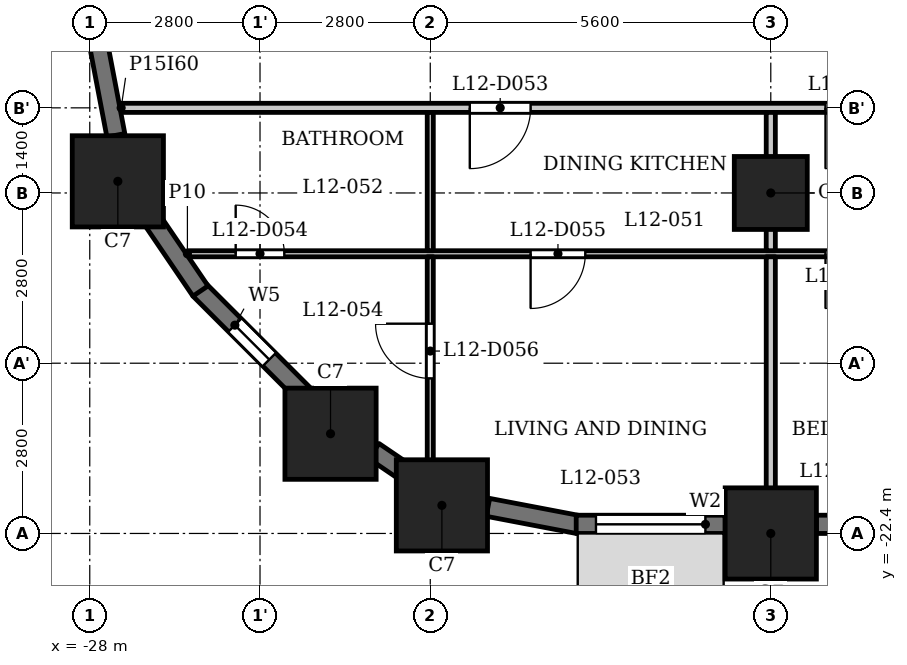
"""IFC4 building model, lengths in metres.
Left out: names, types, materials, properties, quantities, classifications, styles, units other than length and angle.
Written with IfcOpenShell. Run it as: python <this file> out.ifc"""

import sys

from ifc_helpers import new_model, si_unit, direction, frame, frame_2d, origin, origin_2d, place, context, subcontext, project, spatial, rectangle, extrude, element, fill, save


model = new_model("IFC4")
c1 = context("Model", 3, precision=1e-05, world=origin(), true_north=direction((0.0, 1.0)))
c2 = subcontext(c1, "Body", "Model", "MODEL_VIEW")
j1 = project(units=[si_unit("LENGTHUNIT", "METRE"), si_unit("PLANEANGLEUNIT", "RADIAN")], contexts=[c1])
p1 = place(None, origin())
s1 = spatial("IfcSite", under=j1, at=p1, CompositionType="ELEMENT")
p2 = place(p1, origin())
s2 = spatial("IfcBuilding", under=s1, at=p2, CompositionType="ELEMENT")
p3 = place(p2, frame((0.0, 0.0, 51.5)))
s3 = spatial("IfcBuildingStorey", under=s2, at=p3, CompositionType="ELEMENT", Elevation=51.5)
for number, where, z_axis, x_axis in (
    (1, (-22.209, -21.938, 0.0), (0.0, 0.0, 1.0), (1.0, 0.0, 0.0)),
    (2, (-16.8, -22.4, 0.0), (0.0, 0.0, 1.0), (1.0, 0.0, 0.0)),
    (3, (-27.538, -16.609, 0.0), (0.0, 0.0, 1.0), (1.0, 0.0, 0.0)),
    (4, (-24.04, -20.76, 0.0), (0.0, 0.0, 1.0), (1.0, 0.0, 0.0)),
):
    element("IfcColumn", number, at=place(p3, frame(where, z_axis=z_axis, x_axis=x_axis)), inside=s3, PredefinedType="COLUMN", context=c2, shape_type="SweptSolid", body=[
        extrude(rectangle(XDim=1.5, YDim=1.5, at=origin_2d()), origin(), (0.0, 0.0, 1.0), 3.5),
    ])
p4 = place(p3, frame((-16.8, -16.8, 0.0), z_axis=(0.0, 0.0, 1.0), x_axis=(1.0, 0.0, 0.0)))
e5 = element("IfcColumn", 5, at=p4, inside=s3, PredefinedType="COLUMN", context=c2, shape_type="SweptSolid", body=[
    extrude(rectangle(XDim=1.2, YDim=1.2, at=origin_2d()), origin(), (0.0, 0.0, 1.0), 3.5),
])
p5 = place(p3, frame((-26.197, -18.391, 0.0), z_axis=(0.0, 0.0, 1.0), x_axis=(0.707106781187, -0.707106781187, 0.0)))
e6 = element("IfcWall", 6, at=p5, inside=s3, PredefinedType="SOLIDWALL", context=c2, shape_type="SweptSolid", body=[
    extrude(rectangle(XDim=2.45, YDim=0.3, at=frame_2d((1.225, 0.0))), origin(), (0.0, 0.0, 1.0), 2.35),
])
p6 = place(p5, frame((0.825, 0.0, 0.6)))
e7 = element("IfcOpeningElement", 7, at=p6, cuts=e6, PredefinedType="OPENING", context=c2, shape_type="SweptSolid", body=[
    extrude(rectangle(XDim=0.8, YDim=1.55, at=frame_2d((0.4, 0.775))), frame((0.0, 0.16, 0.0), z_axis=(0.0, -1.0, 0.0), x_axis=(1.0, 0.0, 0.0)), (0.0, 0.0, 1.0), 0.32),
])
p7 = place(p3, frame((-23.327, -21.045, 0.0), z_axis=(0.0, 0.0, 1.0), x_axis=(0.827080706709, -0.562083182981, 0.0)))
e8 = element("IfcWall", 8, at=p7, inside=s3, PredefinedType="SOLIDWALL", context=c2, shape_type="SweptSolid", body=[
    extrude(rectangle(XDim=0.677, YDim=0.3, at=frame_2d((0.339, 0.0))), origin(), (0.0, 0.0, 1.0), 3.2),
])
p8 = place(p3, frame((-21.451, -21.97, 0.0), z_axis=(0.0, 0.0, 1.0), x_axis=(0.982287454367, -0.187380247071, 0.0)))
e9 = element("IfcWall", 9, at=p8, inside=s3, PredefinedType="SOLIDWALL", context=c2, shape_type="SweptSolid", body=[
    extrude(rectangle(XDim=1.506, YDim=0.3, at=frame_2d((0.753, 0.0))), origin(), (0.0, 0.0, 1.0), 2.35),
])
p9 = place(p3, frame((-20.0, -22.25, 0.0), z_axis=(0.0, 0.0, 1.0), x_axis=(1.0, 0.0, 0.0)))
e10 = element("IfcWall", 10, at=p9, inside=s3, PredefinedType="SOLIDWALL", context=c2, shape_type="SweptSolid", body=[
    extrude(rectangle(XDim=2.45, YDim=0.3, at=frame_2d((1.225, 0.0))), origin(), (0.0, 0.0, 1.0), 2.35),
])
p10 = place(p9, frame((0.325, 0.0, 0.9)))
e11 = element("IfcOpeningElement", 11, at=p10, cuts=e10, PredefinedType="OPENING", context=c2, shape_type="SweptSolid", body=[
    extrude(rectangle(XDim=1.8, YDim=1.25, at=frame_2d((0.9, 0.625))), frame((0.0, 0.16, 0.0), z_axis=(0.0, -1.0, 0.0), x_axis=(1.0, 0.0, 0.0)), (0.0, 0.0, 1.0), 0.32),
])
p11 = place(p3, frame((-16.05, -22.25, 0.0), z_axis=(0.0, 0.0, 1.0), x_axis=(1.0, 0.0, 0.0)))
e12 = element("IfcWall", 12, at=p11, inside=s3, PredefinedType="SOLIDWALL", context=c2, shape_type="SweptSolid", body=[
    extrude(rectangle(XDim=4.1, YDim=0.3, at=frame_2d((2.05, 0.0))), origin(), (0.0, 0.0, 1.0), 2.35),
])
p12 = place(p11, frame((0.387, 0.0, 0.6)))
e13 = element("IfcOpeningElement", 13, at=p12, cuts=e12, PredefinedType="OPENING", context=c2, shape_type="SweptSolid", body=[
    extrude(rectangle(XDim=1.2, YDim=1.55, at=frame_2d((0.6, 0.775))), frame((0.0, 0.16, 0.0), z_axis=(0.0, -1.0, 0.0), x_axis=(1.0, 0.0, 0.0)), (0.0, 0.0, 1.0), 0.32),
])
p13 = place(p11, frame((2.512, 0.0, 0.6)))
e14 = element("IfcOpeningElement", 14, at=p13, cuts=e12, PredefinedType="OPENING", context=c2, shape_type="SweptSolid", body=[
    extrude(rectangle(XDim=1.2, YDim=1.55, at=frame_2d((0.6, 0.775))), frame((0.0, 0.16, 0.0), z_axis=(0.0, -1.0, 0.0), x_axis=(1.0, 0.0, 0.0)), (0.0, 0.0, 1.0), 0.32),
])
for number, where, z_axis, x_axis in (
    (15, (-27.853, -14.372, 0.0), (0.0, 0.0, 1.0), (0.187, -0.982, 0.0)),
    (16, (-27.025, -17.167, 0.0), (0.0, 0.0, 1.0), (0.562, -0.827, 0.0)),
):
    element("IfcWall", number, at=place(p3, frame(where, z_axis=z_axis, x_axis=x_axis)), inside=s3, PredefinedType="SOLIDWALL", context=c2, shape_type="SweptSolid", body=[
        extrude(rectangle(XDim=1.506, YDim=0.3, at=frame_2d((0.753, 0.0))), origin(), (0.0, 0.0, 1.0), 2.35),
    ])
p14 = place(p3, frame((-26.394, -17.8, 0.0), z_axis=(0.0, 0.0, 1.0), x_axis=(1.0, 0.0, 0.0)))
e17 = element("IfcWall", 17, at=p14, inside=s3, PredefinedType="PARTITIONING", context=c2, shape_type="SweptSolid", body=[
    extrude(rectangle(XDim=53.126, YDim=0.1, at=frame_2d((26.563, 0.0))), origin(), (0.0, 0.0, 1.0), 3.2),
])
p15 = place(p14, frame((0.794, 0.0, 0.0)))
e18 = element("IfcOpeningElement", 18, at=p15, cuts=e17, PredefinedType="OPENING", context=c2, shape_type="SweptSolid", body=[
    extrude(rectangle(XDim=0.8, YDim=2.1, at=frame_2d((0.4, 1.05))), frame((0.0, 0.06, 0.0), z_axis=(0.0, -1.0, 0.0), x_axis=(1.0, 0.0, 0.0)), (0.0, 0.0, 1.0), 0.12),
])
p16 = place(p14, frame((5.644, 0.0, 0.0)))
e19 = element("IfcOpeningElement", 19, at=p16, cuts=e17, PredefinedType="OPENING", context=c2, shape_type="SweptSolid", body=[
    extrude(rectangle(XDim=0.9, YDim=2.1, at=frame_2d((0.45, 1.05))), frame((0.0, 0.06, 0.0), z_axis=(0.0, -1.0, 0.0), x_axis=(1.0, 0.0, 0.0)), (0.0, 0.0, 1.0), 0.12),
])
p17 = place(p14, frame((19.344, 0.0, 0.0)))
e20 = element("IfcOpeningElement", 20, at=p17, cuts=e17, PredefinedType="OPENING", context=c2, shape_type="SweptSolid", body=[
    extrude(rectangle(XDim=0.8, YDim=2.1, at=frame_2d((0.4, 1.05))), frame((0.0, 0.06, 0.0), z_axis=(0.0, -1.0, 0.0), x_axis=(1.0, 0.0, 0.0)), (0.0, 0.0, 1.0), 0.12),
])
p18 = place(p14, frame((17.094, 0.0, 0.0)))
e21 = element("IfcOpeningElement", 21, at=p18, cuts=e17, PredefinedType="OPENING", context=c2, shape_type="SweptSolid", body=[
    extrude(rectangle(XDim=0.9, YDim=2.1, at=frame_2d((0.45, 1.05))), frame((0.0, 0.06, 0.0), z_axis=(0.0, -1.0, 0.0), x_axis=(1.0, 0.0, 0.0)), (0.0, 0.0, 1.0), 0.12),
])
p19 = place(p14, frame((10.494, 0.0, 0.0)))
e22 = element("IfcOpeningElement", 22, at=p19, cuts=e17, PredefinedType="OPENING", context=c2, shape_type="SweptSolid", body=[
    extrude(rectangle(XDim=0.9, YDim=2.1, at=frame_2d((0.45, 1.05))), frame((0.0, 0.06, 0.0), z_axis=(0.0, -1.0, 0.0), x_axis=(1.0, 0.0, 0.0)), (0.0, 0.0, 1.0), 0.12),
])
p20 = place(p14, frame((13.294, 0.0, 0.0)))
e23 = element("IfcOpeningElement", 23, at=p20, cuts=e17, PredefinedType="OPENING", context=c2, shape_type="SweptSolid", body=[
    extrude(rectangle(XDim=0.9, YDim=2.1, at=frame_2d((0.45, 1.05))), frame((0.0, 0.06, 0.0), z_axis=(0.0, -1.0, 0.0), x_axis=(1.0, 0.0, 0.0)), (0.0, 0.0, 1.0), 0.12),
])
p21 = place(p14, frame((27.044, 0.0, 0.0)))
e24 = element("IfcOpeningElement", 24, at=p21, cuts=e17, PredefinedType="OPENING", context=c2, shape_type="SweptSolid", body=[
    extrude(rectangle(XDim=0.8, YDim=2.1, at=frame_2d((0.4, 1.05))), frame((0.0, 0.06, 0.0), z_axis=(0.0, -1.0, 0.0), x_axis=(1.0, 0.0, 0.0)), (0.0, 0.0, 1.0), 0.12),
])
p22 = place(p14, frame((22.444, 0.0, 0.0)))
e25 = element("IfcOpeningElement", 25, at=p22, cuts=e17, PredefinedType="OPENING", context=c2, shape_type="SweptSolid", body=[
    extrude(rectangle(XDim=0.9, YDim=2.1, at=frame_2d((0.45, 1.05))), frame((0.0, 0.06, 0.0), z_axis=(0.0, -1.0, 0.0), x_axis=(1.0, 0.0, 0.0)), (0.0, 0.0, 1.0), 0.12),
])
p23 = place(p14, frame((36.144, 0.0, 0.0)))
e26 = element("IfcOpeningElement", 26, at=p23, cuts=e17, PredefinedType="OPENING", context=c2, shape_type="SweptSolid", body=[
    extrude(rectangle(XDim=0.8, YDim=2.1, at=frame_2d((0.4, 1.05))), frame((0.0, 0.06, 0.0), z_axis=(0.0, -1.0, 0.0), x_axis=(1.0, 0.0, 0.0)), (0.0, 0.0, 1.0), 0.12),
])
p24 = place(p14, frame((33.644, 0.0, 0.0)))
e27 = element("IfcOpeningElement", 27, at=p24, cuts=e17, PredefinedType="OPENING", context=c2, shape_type="SweptSolid", body=[
    extrude(rectangle(XDim=0.9, YDim=2.1, at=frame_2d((0.45, 1.05))), frame((0.0, 0.06, 0.0), z_axis=(0.0, -1.0, 0.0), x_axis=(1.0, 0.0, 0.0)), (0.0, 0.0, 1.0), 0.12),
])
p25 = place(p14, frame((39.144, 0.0, 0.0)))
e28 = element("IfcOpeningElement", 28, at=p25, cuts=e17, PredefinedType="OPENING", context=c2, shape_type="SweptSolid", body=[
    extrude(rectangle(XDim=0.8, YDim=2.1, at=frame_2d((0.4, 1.05))), frame((0.0, 0.06, 0.0), z_axis=(0.0, -1.0, 0.0), x_axis=(1.0, 0.0, 0.0)), (0.0, 0.0, 1.0), 0.12),
])
p26 = place(p14, frame((41.494, 0.0, 0.0)))
e29 = element("IfcOpeningElement", 29, at=p26, cuts=e17, PredefinedType="OPENING", context=c2, shape_type="SweptSolid", body=[
    extrude(rectangle(XDim=0.9, YDim=2.1, at=frame_2d((0.45, 1.05))), frame((0.0, 0.06, 0.0), z_axis=(0.0, -1.0, 0.0), x_axis=(1.0, 0.0, 0.0)), (0.0, 0.0, 1.0), 0.12),
])
p27 = place(p14, frame((49.362, 0.0, 0.0)))
e30 = element("IfcOpeningElement", 30, at=p27, cuts=e17, PredefinedType="OPENING", context=c2, shape_type="SweptSolid", body=[
    extrude(rectangle(XDim=0.8, YDim=2.1, at=frame_2d((0.4, 1.05))), frame((0.0, 0.06, 0.0), z_axis=(0.0, -1.0, 0.0), x_axis=(1.0, 0.0, 0.0)), (0.0, 0.0, 1.0), 0.12),
])
p28 = place(p14, frame((45.094, 0.0, 0.0)))
e31 = element("IfcOpeningElement", 31, at=p28, cuts=e17, PredefinedType="OPENING", context=c2, shape_type="SweptSolid", body=[
    extrude(rectangle(XDim=0.9, YDim=2.1, at=frame_2d((0.45, 1.05))), frame((0.0, 0.06, 0.0), z_axis=(0.0, -1.0, 0.0), x_axis=(1.0, 0.0, 0.0)), (0.0, 0.0, 1.0), 0.12),
])
p29 = place(p3, frame((-27.484, -15.4, 0.0), z_axis=(0.0, 0.0, 1.0), x_axis=(1.0, 0.0, 0.0)))
e32 = element("IfcWall", 32, at=p29, inside=s3, PredefinedType="PARTITIONING", context=c2, shape_type="SweptSolid", body=[
    extrude(rectangle(XDim=54.968, YDim=0.15, at=frame_2d((27.484, 0.0))), origin(), (0.0, 0.0, 1.0), 3.2),
])
p30 = place(p29, frame((5.734, 0.0, 0.0)))
e33 = element("IfcOpeningElement", 33, at=p30, cuts=e32, PredefinedType="OPENING", context=c2, shape_type="SweptSolid", body=[
    extrude(rectangle(XDim=1.0, YDim=2.1, at=frame_2d((0.5, 1.05))), frame((0.0, 0.085, 0.0), z_axis=(0.0, -1.0, 0.0), x_axis=(1.0, 0.0, 0.0)), (0.0, 0.0, 1.0), 0.17),
])
p31 = place(p29, frame((11.584, 0.0, 0.0)))
e34 = element("IfcOpeningElement", 34, at=p31, cuts=e32, PredefinedType="OPENING", context=c2, shape_type="SweptSolid", body=[
    extrude(rectangle(XDim=1.0, YDim=2.1, at=frame_2d((0.5, 1.05))), frame((0.0, 0.085, 0.0), z_axis=(0.0, -1.0, 0.0), x_axis=(1.0, 0.0, 0.0)), (0.0, 0.0, 1.0), 0.17),
])
p32 = place(p29, frame((22.534, 0.0, 0.0)))
e35 = element("IfcOpeningElement", 35, at=p32, cuts=e32, PredefinedType="OPENING", context=c2, shape_type="SweptSolid", body=[
    extrude(rectangle(XDim=1.0, YDim=2.1, at=frame_2d((0.5, 1.05))), frame((0.0, 0.085, 0.0), z_axis=(0.0, -1.0, 0.0), x_axis=(1.0, 0.0, 0.0)), (0.0, 0.0, 1.0), 0.17),
])
p33 = place(p29, frame((33.734, 0.0, 0.0)))
e36 = element("IfcOpeningElement", 36, at=p33, cuts=e32, PredefinedType="OPENING", context=c2, shape_type="SweptSolid", body=[
    extrude(rectangle(XDim=1.0, YDim=2.1, at=frame_2d((0.5, 1.05))), frame((0.0, 0.085, 0.0), z_axis=(0.0, -1.0, 0.0), x_axis=(1.0, 0.0, 0.0)), (0.0, 0.0, 1.0), 0.17),
])
p34 = place(p29, frame((42.334, 0.0, 0.0)))
e37 = element("IfcOpeningElement", 37, at=p34, cuts=e32, PredefinedType="OPENING", context=c2, shape_type="SweptSolid", body=[
    extrude(rectangle(XDim=1.0, YDim=2.1, at=frame_2d((0.5, 1.05))), frame((0.0, 0.085, 0.0), z_axis=(0.0, -1.0, 0.0), x_axis=(1.0, 0.0, 0.0)), (0.0, 0.0, 1.0), 0.17),
])
p35 = place(p29, frame((45.184, 0.0, 0.0)))
e38 = element("IfcOpeningElement", 38, at=p35, cuts=e32, PredefinedType="OPENING", context=c2, shape_type="SweptSolid", body=[
    extrude(rectangle(XDim=1.0, YDim=2.1, at=frame_2d((0.5, 1.05))), frame((0.0, 0.085, 0.0), z_axis=(0.0, -1.0, 0.0), x_axis=(1.0, 0.0, 0.0)), (0.0, 0.0, 1.0), 0.17),
])
p36 = place(p3, frame((-22.4, -21.72, 0.0), z_axis=(0.0, 0.0, 1.0), x_axis=(0.0, 1.0, 0.0)))
e39 = element("IfcWall", 39, at=p36, inside=s3, PredefinedType="PARTITIONING", context=c2, shape_type="SweptSolid", body=[
    extrude(rectangle(XDim=3.87, YDim=0.1, at=frame_2d((1.935, 0.0))), origin(), (0.0, 0.0, 1.0), 3.2),
])
p37 = place(p36, frame((1.87, 0.0, 0.0)))
e40 = element("IfcOpeningElement", 40, at=p37, cuts=e39, PredefinedType="OPENING", context=c2, shape_type="SweptSolid", body=[
    extrude(rectangle(XDim=0.9, YDim=2.1, at=frame_2d((0.45, 1.05))), frame((0.0, 0.06, 0.0), z_axis=(0.0, -1.0, 0.0), x_axis=(1.0, 0.0, 0.0)), (0.0, 0.0, 1.0), 0.12),
])
p38 = place(p3, frame((-22.4, -17.75, 0.0), z_axis=(0.0, 0.0, 1.0), x_axis=(0.0, 1.0, 0.0)))
e41 = element("IfcWall", 41, at=p38, inside=s3, PredefinedType="PARTITIONING", context=c2, shape_type="SweptSolid", body=[
    extrude(rectangle(XDim=2.275, YDim=0.1, at=frame_2d((1.137, 0.0))), origin(), (0.0, 0.0, 1.0), 3.2),
])
p39 = place(p3, frame((-16.8, -23.13, 0.0), z_axis=(0.0, 0.0, 1.0), x_axis=(0.0, 1.0, 0.0)))
e42 = element("IfcWall", 42, at=p39, inside=s3, PredefinedType="PARTITIONING", context=c2, shape_type="SweptSolid", body=[
    extrude(rectangle(XDim=5.28, YDim=0.15, at=frame_2d((2.64, 0.0))), origin(), (0.0, 0.0, 1.0), 3.2),
])
p40 = place(p3, frame((-16.8, -17.75, 0.0), z_axis=(0.0, 0.0, 1.0), x_axis=(0.0, 1.0, 0.0)))
e43 = element("IfcWall", 43, at=p40, inside=s3, PredefinedType="PARTITIONING", context=c2, shape_type="SweptSolid", body=[
    extrude(rectangle(XDim=2.275, YDim=0.15, at=frame_2d((1.137, 0.0))), origin(), (0.0, 0.0, 1.0), 3.2),
])
p41 = place(p30, origin())
e44 = element("IfcDoor", 44, at=p41, inside=s3, OperationType="SINGLE_SWING_LEFT", PredefinedType="DOOR", context=c2, shape_type="SweptSolid", body=[
    extrude(rectangle(XDim=1.0, YDim=2.1, at=frame_2d((0.5, 1.05))), frame((0.0, 0.025, 0.0), z_axis=(0.0, -1.0, 0.0), x_axis=(1.0, 0.0, 0.0)), (0.0, 0.0, 1.0), 0.05),
])
fill(e33, e44)
p42 = place(p15, origin())
e45 = element("IfcDoor", 45, at=p42, inside=s3, OperationType="SINGLE_SWING_RIGHT", PredefinedType="DOOR", context=c2, shape_type="SweptSolid", body=[
    extrude(rectangle(XDim=0.8, YDim=2.1, at=frame_2d((0.4, 1.05))), frame((0.0, 0.025, 0.0), z_axis=(0.0, -1.0, 0.0), x_axis=(1.0, 0.0, 0.0)), (0.0, 0.0, 1.0), 0.05),
])
fill(e18, e45)
p43 = place(p16, origin())
e46 = element("IfcDoor", 46, at=p43, inside=s3, OperationType="SINGLE_SWING_LEFT", PredefinedType="DOOR", context=c2, shape_type="SweptSolid", body=[
    extrude(rectangle(XDim=0.9, YDim=2.1, at=frame_2d((0.45, 1.05))), frame((0.0, 0.025, 0.0), z_axis=(0.0, -1.0, 0.0), x_axis=(1.0, 0.0, 0.0)), (0.0, 0.0, 1.0), 0.05),
])
fill(e19, e46)
p44 = place(p37, origin())
e47 = element("IfcDoor", 47, at=p44, inside=s3, OperationType="SINGLE_SWING_LEFT", PredefinedType="DOOR", context=c2, shape_type="SweptSolid", body=[
    extrude(rectangle(XDim=0.9, YDim=2.1, at=frame_2d((0.45, 1.05))), frame((0.0, 0.025, 0.0), z_axis=(0.0, -1.0, 0.0), x_axis=(1.0, 0.0, 0.0)), (0.0, 0.0, 1.0), 0.05),
])
fill(e40, e47)
p45 = place(p31, origin())
e48 = element("IfcDoor", 48, at=p45, inside=s3, OperationType="SINGLE_SWING_LEFT", PredefinedType="DOOR", context=c2, shape_type="SweptSolid", body=[
    extrude(rectangle(XDim=1.0, YDim=2.1, at=frame_2d((0.5, 1.05))), frame((0.0, 0.025, 0.0), z_axis=(0.0, -1.0, 0.0), x_axis=(1.0, 0.0, 0.0)), (0.0, 0.0, 1.0), 0.05),
])
fill(e34, e48)
p46 = place(p19, origin())
e49 = element("IfcDoor", 49, at=p46, inside=s3, OperationType="SINGLE_SWING_LEFT", PredefinedType="DOOR", context=c2, shape_type="SweptSolid", body=[
    extrude(rectangle(XDim=0.9, YDim=2.1, at=frame_2d((0.45, 1.05))), frame((0.0, 0.025, 0.0), z_axis=(0.0, -1.0, 0.0), x_axis=(1.0, 0.0, 0.0)), (0.0, 0.0, 1.0), 0.05),
])
fill(e22, e49)
p47 = place(p6, origin())
e50 = element("IfcWindow", 50, at=p47, inside=s3, PartitioningType="SINGLE_PANEL", PredefinedType="WINDOW", context=c2, shape_type="SweptSolid", body=[
    extrude(rectangle(XDim=0.8, YDim=1.55, at=frame_2d((0.4, 0.775))), frame((0.0, 0.03, 0.0), z_axis=(0.0, -1.0, 0.0), x_axis=(1.0, 0.0, 0.0)), (0.0, 0.0, 1.0), 0.06),
])
fill(e7, e50)
p48 = place(p10, origin())
e51 = element("IfcWindow", 51, at=p48, inside=s3, PartitioningType="SINGLE_PANEL", PredefinedType="WINDOW", context=c2, shape_type="SweptSolid", body=[
    extrude(rectangle(XDim=1.8, YDim=1.25, at=frame_2d((0.9, 0.625))), frame((0.0, 0.03, 0.0), z_axis=(0.0, -1.0, 0.0), x_axis=(1.0, 0.0, 0.0)), (0.0, 0.0, 1.0), 0.06),
])
fill(e11, e51)
save(model, sys.argv[1])
